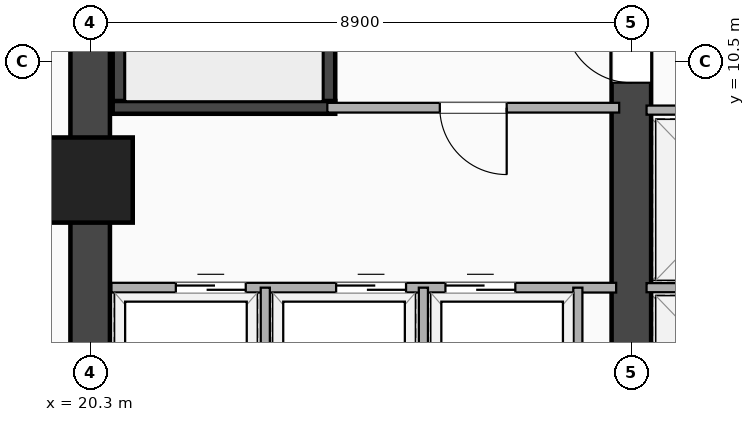
"""IFC4 building model, lengths in metres.
Left out: names, types, materials, properties, quantities, classifications, styles, units other than length and angle.
Written with IfcOpenShell. Run it as: python <this file> out.ifc"""

import sys

from ifc_helpers import new_model, si_unit, direction, frame, frame_2d, origin, origin_2d, place, context, subcontext, project, spatial, rectangle, extrude, element, fill, save


model = new_model("IFC4")
c1 = context("Model", 3, precision=1e-05, world=origin(), true_north=direction((0.0, 1.0)))
c2 = subcontext(c1, "Body", "Model", "MODEL_VIEW")
j1 = project(units=[si_unit("LENGTHUNIT", "METRE"), si_unit("PLANEANGLEUNIT", "RADIAN")], contexts=[c1])
p1 = place(None, origin())
s1 = spatial("IfcSite", under=j1, at=p1, CompositionType="ELEMENT")
p2 = place(p1, origin())
s2 = spatial("IfcBuilding", under=s1, at=p2, CompositionType="ELEMENT")
p3 = place(p2, frame((0.0, 0.0, 64.9)))
s3 = spatial("IfcBuildingStorey", under=s2, at=p3, CompositionType="ELEMENT", Elevation=64.9)
p4 = place(p3, frame((20.3, 3.5, 0.0), z_axis=(0.0, 0.0, 1.0), x_axis=(0.0, 1.0, 0.0)))
e1 = element("IfcWall", 1, at=p4, inside=s3, PredefinedType="SHEAR", context=c2, shape_type="SweptSolid", body=[
    extrude(rectangle(XDim=16.9, YDim=0.65, at=frame_2d((8.45, 0.0))), origin(), (0.0, 0.0, 1.0), 3.22),
])
p5 = place(p3, frame((29.2, 3.5, 0.0), z_axis=(0.0, 0.0, 1.0), x_axis=(0.0, 1.0, 0.0)))
e2 = element("IfcWall", 2, at=p5, inside=s3, PredefinedType="SHEAR", context=c2, shape_type="SweptSolid", body=[
    extrude(rectangle(XDim=16.9, YDim=0.65, at=frame_2d((8.45, 0.0))), origin(), (0.0, 0.0, 1.0), 3.22),
])
p6 = place(p5, frame((7.75, 0.0, 0.0), z_axis=(0.0, 0.0, 1.0), x_axis=(-1.0, 0.0, 0.0)))
e3 = element("IfcOpeningElement", 3, at=p6, cuts=e2, PredefinedType="OPENING", context=c2, shape_type="SweptSolid", body=[
    extrude(rectangle(XDim=1.1, YDim=2.15, at=frame_2d((0.55, 1.075))), frame((0.0, 0.335, 0.0), z_axis=(0.0, -1.0, 0.0), x_axis=(1.0, 0.0, 0.0)), (0.0, 0.0, 1.0), 0.67),
])
for number, where, z_axis, x_axis in (
    (4, (20.775, 9.745, 0.0), (0.0, 0.0, 1.0), (0.0, 1.0, 0.0)),
    (5, (24.225, 9.745, 0.0), (0.0, 0.0, 1.0), (0.0, 1.0, 0.0)),
):
    element("IfcWall", number, at=place(p3, frame(where, z_axis=z_axis, x_axis=x_axis)), inside=s3, PredefinedType="SHEAR", context=c2, shape_type="SweptSolid", body=[
        extrude(rectangle(XDim=8.01, YDim=0.21, at=frame_2d((4.005, 0.0))), origin(), (0.0, 0.0, 1.0), 3.22),
    ])
p7 = place(p3, frame((20.67, 9.745, 0.0), z_axis=(0.0, 0.0, 1.0), x_axis=(1.0, 0.0, 0.0)))
e6 = element("IfcWall", 6, at=p7, inside=s3, PredefinedType="SHEAR", context=c2, shape_type="SweptSolid", body=[
    extrude(rectangle(XDim=3.66, YDim=0.21, at=frame_2d((1.83, 0.0))), origin(), (0.0, 0.0, 1.0), 3.22),
])
p8 = place(p3, frame((20.3, 8.55, -0.28), z_axis=(0.0, 0.0, 1.0), x_axis=(1.0, 0.0, 0.0)))
e7 = element("IfcColumn", 7, at=p8, inside=s3, PredefinedType="COLUMN", context=c2, shape_type="SweptSolid", body=[
    extrude(rectangle(XDim=1.4, YDim=1.4, at=origin_2d()), origin(), (0.0, 0.0, 1.0), 3.5),
])
p9 = place(p3, frame((20.65, 6.78, 0.0), z_axis=(0.0, 0.0, 1.0), x_axis=(1.0, 0.0, 0.0)))
e8 = element("IfcWall", 8, at=p9, inside=s3, PredefinedType="PARTITIONING", context=c2, shape_type="SweptSolid", body=[
    extrude(rectangle(XDim=8.3, YDim=0.16, at=frame_2d((4.15, 0.0))), origin(), (0.0, 0.0, 1.0), 2.51),
])
p10 = place(p9, frame((3.695, 0.0, 0.0)))
e9 = element("IfcOpeningElement", 9, at=p10, cuts=e8, PredefinedType="OPENING", context=c2, shape_type="SweptSolid", body=[
    extrude(rectangle(XDim=1.15, YDim=2.2, at=frame_2d((0.575, 1.1))), frame((0.0, 0.09, 0.0), z_axis=(0.0, -1.0, 0.0), x_axis=(1.0, 0.0, 0.0)), (0.0, 0.0, 1.0), 0.18),
])
p11 = place(p9, frame((5.492, 0.0, 0.0)))
e10 = element("IfcOpeningElement", 10, at=p11, cuts=e8, PredefinedType="OPENING", context=c2, shape_type="SweptSolid", body=[
    extrude(rectangle(XDim=1.15, YDim=2.2, at=frame_2d((0.575, 1.1))), frame((0.0, 0.09, 0.0), z_axis=(0.0, -1.0, 0.0), x_axis=(1.0, 0.0, 0.0)), (0.0, 0.0, 1.0), 0.18),
])
p12 = place(p9, frame((1.059, 0.0, 0.0)))
e11 = element("IfcOpeningElement", 11, at=p12, cuts=e8, PredefinedType="OPENING", context=c2, shape_type="SweptSolid", body=[
    extrude(rectangle(XDim=1.15, YDim=2.2, at=frame_2d((0.575, 1.1))), frame((0.0, 0.09, 0.0), z_axis=(0.0, -1.0, 0.0), x_axis=(1.0, 0.0, 0.0)), (0.0, 0.0, 1.0), 0.18),
])
for number, where, z_axis, x_axis in (
    (12, (23.18, 3.9, 0.0), (0.0, 0.0, 1.0), (0.0, 1.0, 0.0)),
    (13, (25.78, 3.9, 0.0), (0.0, 0.0, 1.0), (0.0, 1.0, 0.0)),
    (14, (28.32, 3.9, 0.0), (0.0, 0.0, 1.0), (0.0, 1.0, 0.0)),
):
    element("IfcWall", number, at=place(p3, frame(where, z_axis=z_axis, x_axis=x_axis)), inside=s3, PredefinedType="PARTITIONING", context=c2, shape_type="SweptSolid", body=[
        extrude(rectangle(XDim=2.88, YDim=0.15, at=frame_2d((1.44, 0.0))), origin(), (0.0, 0.0, 1.0), 3.22),
    ])
p13 = place(p3, frame((24.2, 9.74, 0.0), z_axis=(0.0, 0.0, 1.0), x_axis=(1.0, 0.0, 0.0)))
e15 = element("IfcWall", 15, at=p13, inside=s3, PredefinedType="PARTITIONING", context=c2, shape_type="SweptSolid", body=[
    extrude(rectangle(XDim=4.8, YDim=0.16, at=frame_2d((2.4, 0.0))), origin(), (0.0, 0.0, 1.0), 3.22),
])
p14 = place(p13, frame((1.85, 0.0, 0.0)))
e16 = element("IfcOpeningElement", 16, at=p14, cuts=e15, PredefinedType="OPENING", context=c2, shape_type="SweptSolid", body=[
    extrude(rectangle(XDim=1.1, YDim=2.15, at=frame_2d((0.55, 1.075))), frame((0.0, 0.09, 0.0), z_axis=(0.0, -1.0, 0.0), x_axis=(1.0, 0.0, 0.0)), (0.0, 0.0, 1.0), 0.18),
])
for number, where, z_axis, x_axis in (
    (17, (29.45, 6.78, 0.0), (0.0, 0.0, 1.0), (1.0, 0.0, 0.0)),
    (18, (29.45, 9.7, 0.0), (0.0, 0.0, 1.0), (1.0, 0.0, 0.0)),
):
    element("IfcWall", number, at=place(p3, frame(where, z_axis=z_axis, x_axis=x_axis)), inside=s3, PredefinedType="PARTITIONING", context=c2, shape_type="SweptSolid", body=[
        extrude(rectangle(XDim=2.77, YDim=0.15, at=frame_2d((1.385, 0.0))), origin(), (0.0, 0.0, 1.0), 3.22),
    ])
p15 = place(p6, origin())
e19 = element("IfcDoor", 19, at=p15, inside=s3, OperationType="SINGLE_SWING_RIGHT", PredefinedType="DOOR", context=c2, shape_type="SweptSolid", body=[
    extrude(rectangle(XDim=1.1, YDim=2.15, at=frame_2d((0.55, 1.075))), frame((0.0, 0.025, 0.0), z_axis=(0.0, -1.0, 0.0), x_axis=(1.0, 0.0, 0.0)), (0.0, 0.0, 1.0), 0.05),
])
fill(e3, e19)
p16 = place(p10, origin())
e20 = element("IfcDoor", 20, at=p16, inside=s3, OperationType="DOUBLE_DOOR_SLIDING", PredefinedType="DOOR", context=c2, shape_type="SweptSolid", body=[
    extrude(rectangle(XDim=1.15, YDim=2.2, at=frame_2d((0.575, 1.1))), frame((0.0, 0.025, 0.0), z_axis=(0.0, -1.0, 0.0), x_axis=(1.0, 0.0, 0.0)), (0.0, 0.0, 1.0), 0.05),
])
fill(e9, e20)
p17 = place(p11, origin())
e21 = element("IfcDoor", 21, at=p17, inside=s3, OperationType="DOUBLE_DOOR_SLIDING", PredefinedType="DOOR", context=c2, shape_type="SweptSolid", body=[
    extrude(rectangle(XDim=1.15, YDim=2.2, at=frame_2d((0.575, 1.1))), frame((0.0, 0.025, 0.0), z_axis=(0.0, -1.0, 0.0), x_axis=(1.0, 0.0, 0.0)), (0.0, 0.0, 1.0), 0.05),
])
fill(e10, e21)
p18 = place(p12, origin())
e22 = element("IfcDoor", 22, at=p18, inside=s3, OperationType="DOUBLE_DOOR_SLIDING", PredefinedType="DOOR", context=c2, shape_type="SweptSolid", body=[
    extrude(rectangle(XDim=1.15, YDim=2.2, at=frame_2d((0.575, 1.1))), frame((0.0, 0.025, 0.0), z_axis=(0.0, -1.0, 0.0), x_axis=(1.0, 0.0, 0.0)), (0.0, 0.0, 1.0), 0.05),
])
fill(e11, e22)
p19 = place(p14, origin())
e23 = element("IfcDoor", 23, at=p19, inside=s3, OperationType="SINGLE_SWING_RIGHT", PredefinedType="DOOR", context=c2, shape_type="SweptSolid", body=[
    extrude(rectangle(XDim=1.1, YDim=2.15, at=frame_2d((0.55, 1.075))), frame((0.0, 0.025, 0.0), z_axis=(0.0, -1.0, 0.0), x_axis=(1.0, 0.0, 0.0)), (0.0, 0.0, 1.0), 0.05),
])
fill(e16, e23)
save(model, sys.argv[1])
